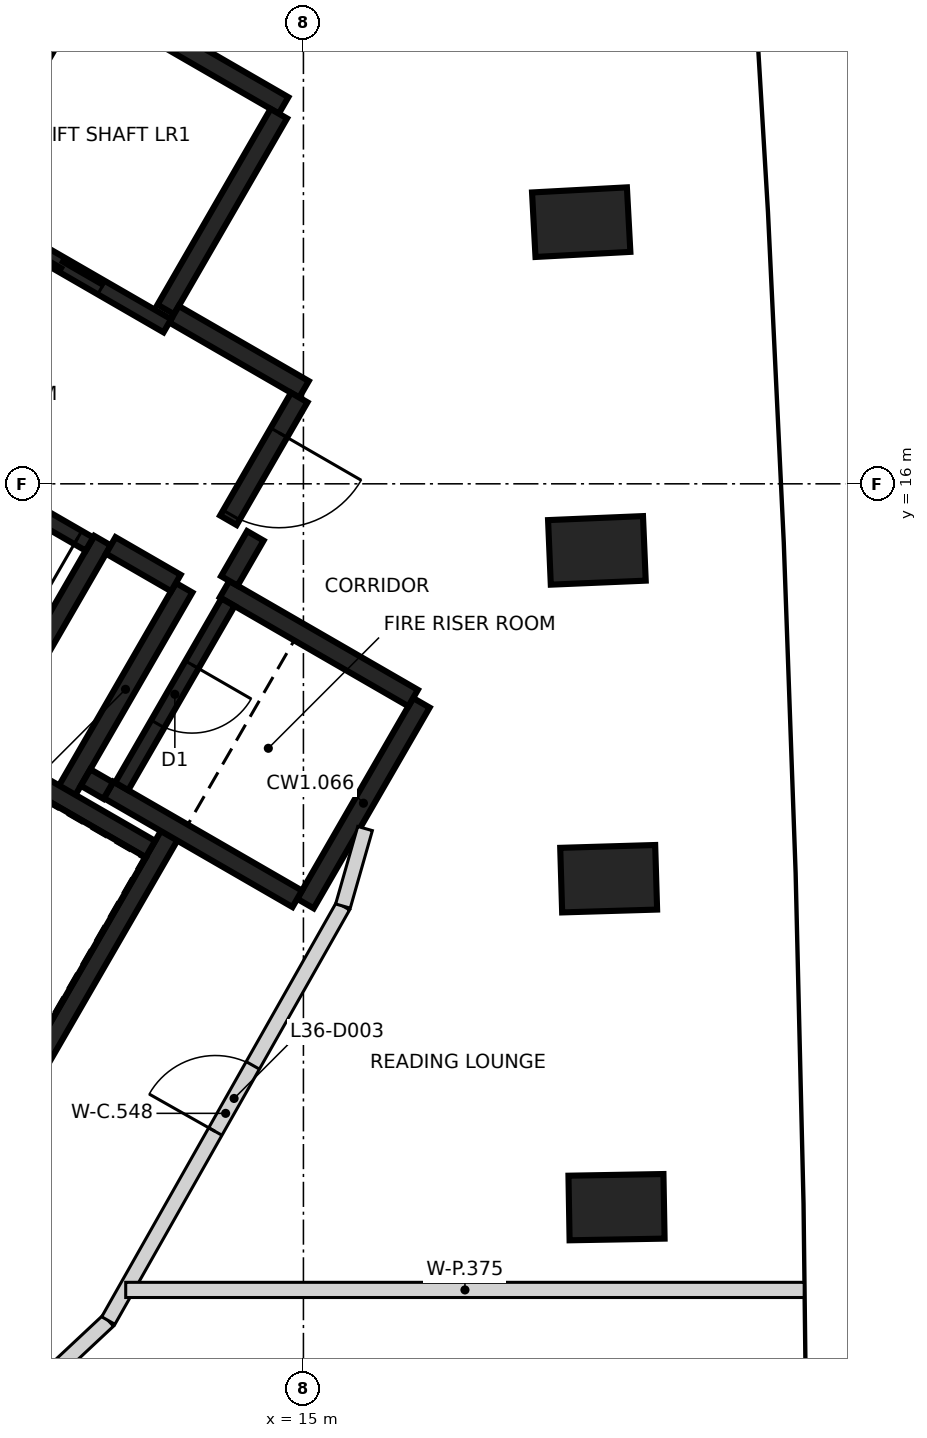
"""IFC4 building model, lengths in metres.
Left out: names, types, materials, properties, quantities, classifications, styles, units other than length and angle.
Written with IfcOpenShell. Run it as: python <this file> out.ifc"""

import sys

from ifc_helpers import new_model, si_unit, direction, frame, frame_2d, origin, origin_2d, place, context, subcontext, project, spatial, rectangle, extrude, element, fill, save


model = new_model("IFC4")
c1 = context("Model", 3, precision=1e-05, world=origin(), true_north=direction((0.0, 1.0)))
c2 = subcontext(c1, "Body", "Model", "MODEL_VIEW")
j1 = project(units=[si_unit("LENGTHUNIT", "METRE"), si_unit("PLANEANGLEUNIT", "RADIAN")], contexts=[c1])
p1 = place(None, origin())
s1 = spatial("IfcSite", under=j1, at=p1, CompositionType="ELEMENT")
p2 = place(p1, origin())
s2 = spatial("IfcBuilding", under=s1, at=p2, CompositionType="ELEMENT")
p3 = place(p2, frame((0.0, 0.0, 146.8)))
s3 = spatial("IfcBuildingStorey", under=s2, at=p3, CompositionType="ELEMENT", Elevation=146.8)
for number, where, z_axis, x_axis in (
    (1, (19.119, 6.484, -0.4), (0.0, 0.0, 1.0), (1.0, 0.018, 0.0)),
    (2, (19.016, 10.805, -0.4), (0.0, 0.0, 1.0), (1.0, 0.03, 0.0)),
    (3, (18.861, 15.124, -0.4), (0.0, 0.0, 1.0), (0.999, 0.042, 0.0)),
    (4, (18.655, 19.442, -0.4), (0.0, 0.0, 1.0), (0.999, 0.054, 0.0)),
):
    element("IfcColumn", number, at=place(p3, frame(where, z_axis=z_axis, x_axis=x_axis)), inside=s3, PredefinedType="COLUMN", context=c2, shape_type="SweptSolid", body=[
        extrude(rectangle(XDim=1.25, YDim=0.85, at=origin_2d()), origin(), (0.0, 0.0, 1.0), 3.6),
    ])
p4 = place(p3, frame((9.673, 23.903, 0.0), z_axis=(0.0, 0.0, 1.0), x_axis=(0.86603616409, -0.499981362141, 0.0)))
e5 = element("IfcWall", 5, at=p4, inside=s3, PredefinedType="SHEAR", context=c2, shape_type="SweptSolid", body=[
    extrude(rectangle(XDim=5.85, YDim=0.25, at=frame_2d((2.925, 0.0))), origin(), (0.0, 0.0, 1.0), 3.2),
])
p5 = place(p3, frame((13.238, 11.378, 0.0), z_axis=(0.0, 0.0, 1.0), x_axis=(-0.500008851346, -0.866020293397, 0.0)))
e6 = element("IfcWall", 6, at=p5, inside=s3, PredefinedType="SHEAR", context=c2, shape_type="SweptSolid", body=[
    extrude(rectangle(XDim=5.51, YDim=0.25, at=frame_2d((2.755, 0.0))), origin(), (0.0, 0.0, 1.0), 3.2),
])
p6 = place(p3, frame((12.357, 15.252, 0.0), z_axis=(0.0, 0.0, 1.0), x_axis=(-0.500028443584, -0.866008981251, 0.0)))
e7 = element("IfcWall", 7, at=p6, inside=s3, PredefinedType="SHEAR", context=c2, shape_type="SweptSolid", body=[
    extrude(rectangle(XDim=3.2, YDim=0.25, at=frame_2d((1.6, 0.0))), origin(), (0.0, 0.0, 1.0), 3.2),
])
p7 = place(p3, frame((14.676, 20.87, 0.0), z_axis=(0.0, 0.0, 1.0), x_axis=(-0.499987686533, -0.866032512851, 0.0)))
e8 = element("IfcWall", 8, at=p7, inside=s3, PredefinedType="SHEAR", context=c2, shape_type="SweptSolid", body=[
    extrude(rectangle(XDim=2.975, YDim=0.25, at=frame_2d((1.487, 0.0))), origin(), (0.0, 0.0, 1.0), 3.2),
])
p8 = place(p3, frame((16.552, 13.119, 0.0), z_axis=(0.0, 0.0, 1.0), x_axis=(-0.499978833458, -0.866037623948, 0.0)))
e9 = element("IfcWall", 9, at=p8, inside=s3, PredefinedType="SHEAR", context=c2, shape_type="SweptSolid", body=[
    extrude(rectangle(XDim=3.05, YDim=0.25, at=frame_2d((1.525, 0.0))), origin(), (0.0, 0.0, 1.0), 3.2),
])
p9 = place(p3, frame((14.918, 10.54, 0.0), z_axis=(0.0, 0.0, 1.0), x_axis=(-0.866063538972, 0.499933942099, 0.0)))
e10 = element("IfcWall", 10, at=p9, inside=s3, PredefinedType="SHEAR", context=c2, shape_type="SweptSolid", body=[
    extrude(rectangle(XDim=2.865, YDim=0.25, at=frame_2d((1.432, 0.0))), origin(), (0.0, 0.0, 1.0), 3.2),
])
p10 = place(p3, frame((13.963, 14.614, 0.0), z_axis=(0.0, 0.0, 1.0), x_axis=(0.866042235819, -0.499970844928, 0.0)))
e11 = element("IfcWall", 11, at=p10, inside=s3, PredefinedType="SHEAR", context=c2, shape_type="SweptSolid", body=[
    extrude(rectangle(XDim=2.865, YDim=0.25, at=frame_2d((1.432, 0.0))), origin(), (0.0, 0.0, 1.0), 3.2),
])
p11 = place(p3, frame((11.888, 11.961, 0.0), z_axis=(0.0, 0.0, 1.0), x_axis=(0.500003324108, 0.866023484601, 0.0)))
e12 = element("IfcWall", 12, at=p11, inside=s3, PredefinedType="SHEAR", context=c2, shape_type="SweptSolid", body=[
    extrude(rectangle(XDim=3.085, YDim=0.25, at=frame_2d((1.542, 0.0))), origin(), (0.0, 0.0, 1.0), 3.2),
])
p12 = place(p3, frame((10.865, 12.418, 0.0), z_axis=(0.0, 0.0, 1.0), x_axis=(0.866026229868, -0.499998569178, 0.0)))
e13 = element("IfcWall", 13, at=p12, inside=s3, PredefinedType="SHEAR", context=c2, shape_type="SweptSolid", body=[
    extrude(rectangle(XDim=2.449, YDim=0.25, at=frame_2d((1.225, 0.0))), origin(), (0.0, 0.0, 1.0), 3.2),
])
p13 = place(p3, frame((13.297, 18.231, 0.0), z_axis=(0.0, 0.0, 1.0), x_axis=(0.866043531843, -0.499968599967, 0.0)))
e14 = element("IfcWall", 14, at=p13, inside=s3, PredefinedType="SHEAR", context=c2, shape_type="SweptSolid", body=[
    extrude(rectangle(XDim=1.975, YDim=0.25, at=frame_2d((0.987, 0.0))), origin(), (0.0, 0.0, 1.0), 3.2),
])
p14 = place(p3, frame((14.945, 17.135, 0.0), z_axis=(0.0, 0.0, 1.0), x_axis=(-0.499983108224, -0.866035156036, 0.0)))
e15 = element("IfcWall", 15, at=p14, inside=s3, PredefinedType="SHEAR", context=c2, shape_type="SweptSolid", body=[
    extrude(rectangle(XDim=1.865, YDim=0.25, at=frame_2d((0.932, 0.0))), origin(), (0.0, 0.0, 1.0), 3.2),
])
p15 = place(p14, frame((0.535, 0.0, 0.0)))
e16 = element("IfcOpeningElement", 16, at=p15, cuts=e15, PredefinedType="OPENING", context=c2, shape_type="SweptSolid", body=[
    extrude(rectangle(XDim=1.25, YDim=2.1, at=frame_2d((0.625, 1.05))), frame((0.0, 0.135, 0.0), z_axis=(0.0, -1.0, 0.0), x_axis=(1.0, 0.0, 0.0)), (0.0, 0.0, 1.0), 0.27),
])
p16 = place(p3, frame((13.322, 14.695, 0.0), z_axis=(0.0, 0.0, 1.0), x_axis=(-0.866017078145, 0.500014420154, 0.0)))
e17 = element("IfcWall", 17, at=p16, inside=s3, PredefinedType="SHEAR", context=c2, shape_type="SweptSolid", body=[
    extrude(rectangle(XDim=0.989, YDim=0.25, at=frame_2d((0.495, 0.0))), origin(), (0.0, 0.0, 1.0), 3.2),
])
p17 = place(p3, frame((14.368, 15.315, 0.0), z_axis=(0.0, 0.0, 1.0), x_axis=(-0.499897359611, -0.866084655132, 0.0)))
e18 = element("IfcWall", 18, at=p17, inside=s3, PredefinedType="SHEAR", context=c2, shape_type="SweptSolid", body=[
    extrude(rectangle(XDim=0.685, YDim=0.25, at=frame_2d((0.342, 0.0))), origin(), (0.0, 0.0, 1.0), 3.2),
])
p18 = place(p3, frame((12.433, 11.964, 0.0), z_axis=(0.0, 0.0, 1.0), x_axis=(-0.866055875208, 0.499947218231, 0.0)))
e19 = element("IfcWall", 19, at=p18, inside=s3, PredefinedType="SHEAR", context=c2, shape_type="SweptSolid", body=[
    extrude(rectangle(XDim=0.345, YDim=0.25, at=frame_2d((0.172, 0.0))), origin(), (0.0, 0.0, 1.0), 3.2),
])
p19 = place(p3, frame((13.21, 18.08, 0.0), z_axis=(0.0, 0.0, 1.0), x_axis=(-0.866030299012, 0.499991521122, 0.0)))
e20 = element("IfcWall", 20, at=p19, inside=s3, PredefinedType="SHEAR", context=c2, shape_type="SweptSolid", body=[
    extrude(rectangle(XDim=6.1, YDim=0.2, at=frame_2d((3.05, 0.0))), origin(), (0.0, 0.0, 1.0), 3.2),
])
p20 = place(p19, frame((1.0, 0.0, 0.0)))
e21 = element("IfcOpeningElement", 21, at=p20, cuts=e20, PredefinedType="OPENING", context=c2, shape_type="SweptSolid", body=[
    extrude(rectangle(XDim=1.2, YDim=2.1, at=frame_2d((0.6, 1.05))), frame((0.0, 0.11, 0.0), z_axis=(0.0, -1.0, 0.0), x_axis=(1.0, 0.0, 0.0)), (0.0, 0.0, 1.0), 0.22),
])
p21 = place(p19, frame((4.05, 0.0, 0.0)))
e22 = element("IfcOpeningElement", 22, at=p21, cuts=e20, PredefinedType="OPENING", context=c2, shape_type="SweptSolid", body=[
    extrude(rectangle(XDim=1.2, YDim=2.1, at=frame_2d((0.6, 1.05))), frame((0.0, 0.11, 0.0), z_axis=(0.0, -1.0, 0.0), x_axis=(1.0, 0.0, 0.0)), (0.0, 0.0, 1.0), 0.22),
])
p22 = place(p3, frame((12.185, 15.207, 0.0), z_axis=(0.0, 0.0, 1.0), x_axis=(-0.866020080793, 0.500009219579, 0.0)))
e23 = element("IfcWall", 23, at=p22, inside=s3, PredefinedType="SHEAR", context=c2, shape_type="SweptSolid", body=[
    extrude(rectangle(XDim=5.699, YDim=0.2, at=frame_2d((2.85, 0.0))), origin(), (0.0, 0.0, 1.0), 3.2),
])
p23 = place(p22, frame((0.174, 0.0, 0.0)))
e24 = element("IfcOpeningElement", 24, at=p23, cuts=e23, PredefinedType="OPENING", context=c2, shape_type="SweptSolid", body=[
    extrude(rectangle(XDim=0.9, YDim=2.1, at=frame_2d((0.45, 1.05))), frame((0.0, 0.11, 0.0), z_axis=(0.0, -1.0, 0.0), x_axis=(1.0, 0.0, 0.0)), (0.0, 0.0, 1.0), 0.22),
])
p24 = place(p22, frame((4.599, 0.0, 0.0)))
e25 = element("IfcOpeningElement", 25, at=p24, cuts=e23, PredefinedType="OPENING", context=c2, shape_type="SweptSolid", body=[
    extrude(rectangle(XDim=0.9, YDim=2.1, at=frame_2d((0.45, 1.05))), frame((0.0, 0.11, 0.0), z_axis=(0.0, -1.0, 0.0), x_axis=(1.0, 0.0, 0.0)), (0.0, 0.0, 1.0), 0.22),
])
p25 = place(p3, frame((10.489, 19.767, 0.0), z_axis=(0.0, 0.0, 1.0), x_axis=(0.499946628782, 0.866056215479, 0.0)))
e26 = element("IfcWall", 26, at=p25, inside=s3, PredefinedType="SHEAR", context=c2, shape_type="SweptSolid", body=[
    extrude(rectangle(XDim=3.048, YDim=0.2, at=frame_2d((1.524, 0.0))), origin(), (0.0, 0.0, 1.0), 3.2),
])
p26 = place(p3, frame((14.008, 14.442, 0.0), z_axis=(0.0, 0.0, 1.0), x_axis=(-0.499986818241, -0.866033014143, 0.0)))
e27 = element("IfcWall", 27, at=p26, inside=s3, PredefinedType="SHEAR", context=c2, shape_type="SweptSolid", body=[
    extrude(rectangle(XDim=2.798, YDim=0.2, at=frame_2d((1.399, 0.0))), origin(), (0.0, 0.0, 1.0), 3.2),
])
p27 = place(p26, frame((0.949, 0.0, 0.0)))
e28 = element("IfcOpeningElement", 28, at=p27, cuts=e27, PredefinedType="OPENING", context=c2, shape_type="SweptSolid", body=[
    extrude(rectangle(XDim=0.9, YDim=2.1, at=frame_2d((0.45, 1.05))), frame((0.0, 0.11, 0.0), z_axis=(0.0, -1.0, 0.0), x_axis=(1.0, 0.0, 0.0)), (0.0, 0.0, 1.0), 0.22),
])
p28 = place(p3, frame((11.458, 4.078, 0.0), z_axis=(0.0, 0.0, 1.0), x_axis=(0.729936032318, 0.683515463412, 0.0)))
e29 = element("IfcWall", 29, at=p28, inside=s3, PredefinedType="PARTITIONING", context=c2, shape_type="SweptSolid", body=[
    extrude(rectangle(XDim=1.336, YDim=0.2, at=frame_2d((0.668, 0.0))), origin(), (0.0, 0.0, 1.0), 3.2),
])
p29 = place(p3, frame((12.433, 4.992, 0.0), z_axis=(0.0, 0.0, 1.0), x_axis=(0.492740203499, 0.870176471675, 0.0)))
e30 = element("IfcWall", 30, at=p29, inside=s3, PredefinedType="PARTITIONING", context=c2, shape_type="SweptSolid", body=[
    extrude(rectangle(XDim=6.265, YDim=0.2, at=frame_2d((3.133, 0.0))), origin(), (0.0, 0.0, 1.0), 3.2),
])
p30 = place(p29, frame((2.858, 0.0, 0.0)))
e31 = element("IfcOpeningElement", 31, at=p30, cuts=e30, PredefinedType="OPENING", context=c2, shape_type="SweptSolid", body=[
    extrude(rectangle(XDim=1.0, YDim=2.1, at=frame_2d((0.5, 1.05))), frame((0.0, 0.11, 0.0), z_axis=(0.0, -1.0, 0.0), x_axis=(1.0, 0.0, 0.0)), (0.0, 0.0, 1.0), 0.22),
])
p31 = place(p3, frame((15.52, 10.445, 0.0), z_axis=(0.0, 0.0, 1.0), x_axis=(0.274143458758, 0.961688808306, 0.0)))
e32 = element("IfcWall", 32, at=p31, inside=s3, PredefinedType="PARTITIONING", context=c2, shape_type="SweptSolid", body=[
    extrude(rectangle(XDim=1.061, YDim=0.2, at=frame_2d((0.53, 0.0))), origin(), (0.0, 0.0, 1.0), 3.2),
])
p32 = place(p3, frame((12.662, 5.395, 0.0), z_axis=(0.0, 0.0, 1.0), x_axis=(1.0, 0.0, 0.0)))
e33 = element("IfcWall", 33, at=p32, inside=s3, PredefinedType="PARTITIONING", context=c2, shape_type="SweptSolid", body=[
    extrude(rectangle(XDim=8.926, YDim=0.2, at=frame_2d((4.463, 0.0))), origin(), (0.0, 0.0, 1.0), 2.3),
])
p33 = place(p20, origin())
e34 = element("IfcDoor", 34, at=p33, inside=s3, OperationType="DOUBLE_DOOR_SLIDING", PredefinedType="DOOR", context=c2, shape_type="SweptSolid", body=[
    extrude(rectangle(XDim=1.2, YDim=2.1, at=frame_2d((0.6, 1.05))), frame((0.0, 0.025, 0.0), z_axis=(0.0, -1.0, 0.0), x_axis=(1.0, 0.0, 0.0)), (0.0, 0.0, 1.0), 0.05),
])
fill(e21, e34)
p34 = place(p15, origin())
e35 = element("IfcDoor", 35, at=p34, inside=s3, OperationType="SINGLE_SWING_LEFT", PredefinedType="DOOR", context=c2, shape_type="SweptSolid", body=[
    extrude(rectangle(XDim=1.25, YDim=2.1, at=frame_2d((0.625, 1.05))), frame((0.0, 0.025, 0.0), z_axis=(0.0, -1.0, 0.0), x_axis=(1.0, 0.0, 0.0)), (0.0, 0.0, 1.0), 0.05),
])
fill(e16, e35)
p35 = place(p23, origin())
e36 = element("IfcDoor", 36, at=p35, inside=s3, OperationType="SINGLE_SWING_LEFT", PredefinedType="DOOR", context=c2, shape_type="SweptSolid", body=[
    extrude(rectangle(XDim=0.9, YDim=2.1, at=frame_2d((0.45, 1.05))), frame((0.0, 0.025, 0.0), z_axis=(0.0, -1.0, 0.0), x_axis=(1.0, 0.0, 0.0)), (0.0, 0.0, 1.0), 0.05),
])
fill(e24, e36)
p36 = place(p27, origin())
e37 = element("IfcDoor", 37, at=p36, inside=s3, OperationType="SINGLE_SWING_LEFT", PredefinedType="DOOR", context=c2, shape_type="SweptSolid", body=[
    extrude(rectangle(XDim=0.9, YDim=2.1, at=frame_2d((0.45, 1.05))), frame((0.0, 0.025, 0.0), z_axis=(0.0, -1.0, 0.0), x_axis=(1.0, 0.0, 0.0)), (0.0, 0.0, 1.0), 0.05),
])
fill(e28, e37)
p37 = place(p30, frame((1.0, 0.0, 0.0), z_axis=(0.0, 0.0, 1.0), x_axis=(-1.0, 0.0, 0.0)))
e38 = element("IfcDoor", 38, at=p37, inside=s3, OperationType="SINGLE_SWING_LEFT", PredefinedType="DOOR", context=c2, shape_type="SweptSolid", body=[
    extrude(rectangle(XDim=1.0, YDim=2.1, at=frame_2d((0.5, 1.05))), frame((0.0, 0.025, 0.0), z_axis=(0.0, -1.0, 0.0), x_axis=(1.0, 0.0, 0.0)), (0.0, 0.0, 1.0), 0.05),
])
fill(e31, e38)
save(model, sys.argv[1])
